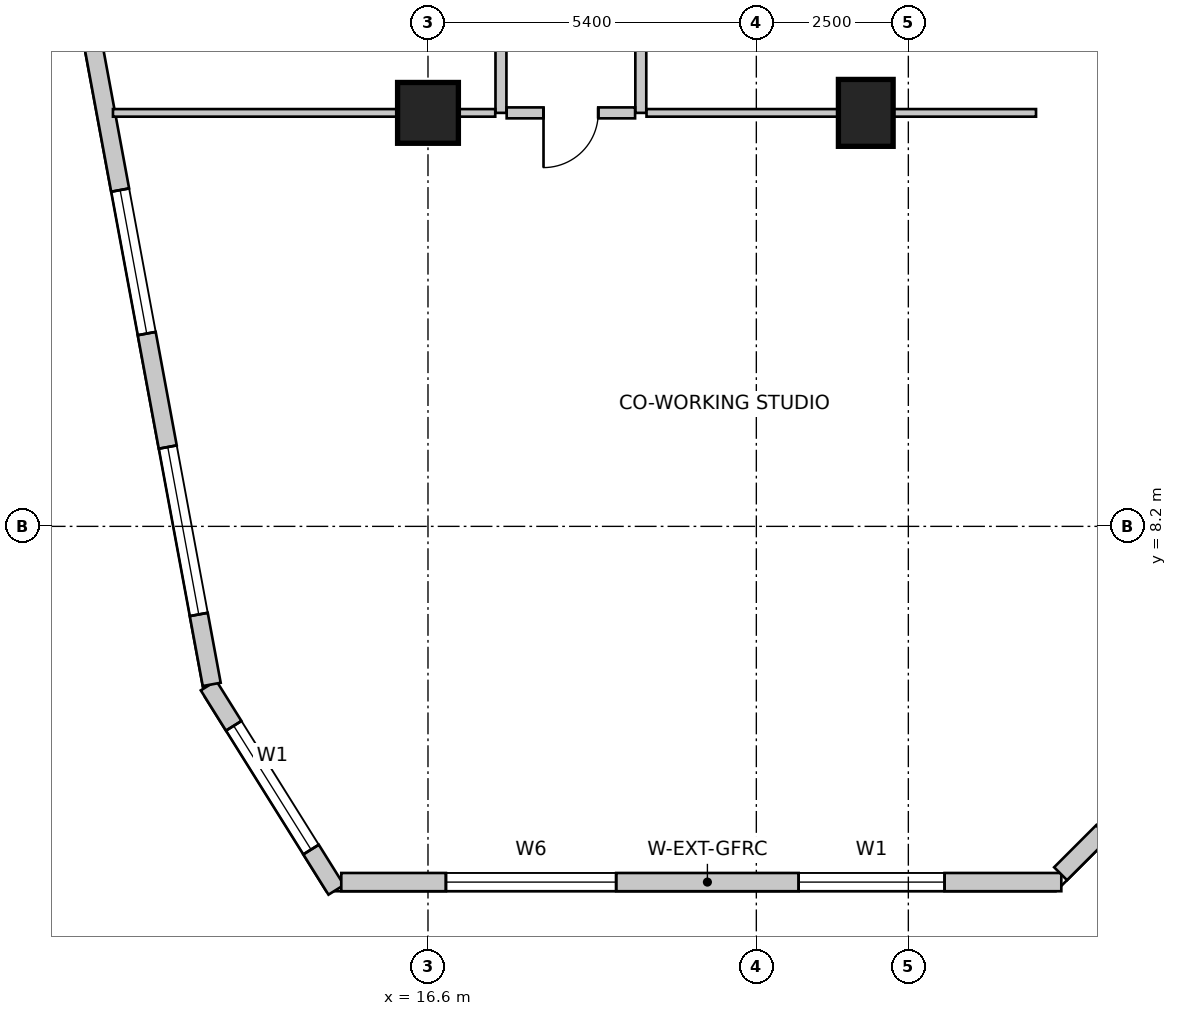
"""IFC4 building model, lengths in metres.
Left out: names, types, materials, properties, quantities, classifications, styles, units other than length and angle.
Written with IfcOpenShell. Run it as: python <this file> out.ifc"""

import sys

from ifc_helpers import new_model, si_unit, direction, frame, frame_2d, origin, origin_2d, place, context, subcontext, project, spatial, rectangle, extrude, source, transform, mapped, element, fill, save


model = new_model("IFC4")
c1 = context("Model", 3, precision=1e-05, world=origin(), true_north=direction((0.0, 1.0)))
c2 = subcontext(c1, "Body", "Model", "MODEL_VIEW")
j1 = project(units=[si_unit("LENGTHUNIT", "METRE"), si_unit("PLANEANGLEUNIT", "RADIAN")], contexts=[c1])
p1 = place(None, origin())
s1 = spatial("IfcSite", under=j1, at=p1, CompositionType="ELEMENT")
p2 = place(p1, origin())
s2 = spatial("IfcBuilding", under=s1, at=p2, CompositionType="ELEMENT")
p3 = place(p2, frame((0.0, 0.0, 51.0)))
s3 = spatial("IfcBuildingStorey", under=s2, at=p3, CompositionType="ELEMENT", Elevation=51.0)
m1 = source(origin(), c2, "Body", "SweptSolid", [
    extrude(rectangle(XDim=0.9, YDim=1.1, at=origin_2d()), origin(), (0.0, 0.0, 1.0), 4.0),
])
p4 = place(p3, frame((23.8, 15.0, 0.0), z_axis=(0.0, 0.0, 1.0), x_axis=(1.0, 0.0, 0.0)))
e1 = element("IfcColumn", 1, at=p4, inside=s3, PredefinedType="COLUMN", context=c2, shape_type="MappedRepresentation", body=[
    mapped(m1, transform((0.0, 0.0, 0.0), scale=1.0)),
])
m2 = source(origin(), c2, "Body", "SweptSolid", [
    extrude(rectangle(XDim=1.0, YDim=1.0, at=origin_2d()), origin(), (0.0, 0.0, 1.0), 4.0),
])
p5 = place(p3, frame((16.6, 15.0, 0.0), z_axis=(0.0, 0.0, 1.0), x_axis=(1.0, 0.0, 0.0)))
e2 = element("IfcColumn", 2, at=p5, inside=s3, PredefinedType="COLUMN", context=c2, shape_type="MappedRepresentation", body=[
    mapped(m2, transform((0.0, 0.0, 0.0), scale=1.0)),
])
p6 = place(p3, frame((12.991, 5.583, 0.0), z_axis=(0.0, 0.0, 1.0), x_axis=(0.530015557218, -0.847987918019, 0.0)))
e3 = element("IfcWall", 3, at=p6, inside=s3, PredefinedType="SOLIDWALL", context=c2, shape_type="SweptSolid", body=[
    extrude(rectangle(XDim=3.962, YDim=0.3, at=frame_2d((1.981, 0.0))), origin(), (0.0, 0.0, 1.0), 3.75),
])
m3 = source(origin(), c2, "Body", "SweptSolid", [
    extrude(rectangle(XDim=2.4, YDim=2.2, at=frame_2d((1.2, 1.1))), frame((0.0, 0.16, 0.0), z_axis=(0.0, -1.0, 0.0), x_axis=(1.0, 0.0, 0.0)), (0.0, 0.0, 1.0), 0.32),
])
p7 = place(p6, frame((0.781, 0.0, 0.85)))
e4 = element("IfcOpeningElement", 4, at=p7, cuts=e3, PredefinedType="OPENING", context=c2, shape_type="MappedRepresentation", body=[
    mapped(m3, transform((0.0, 0.0, 0.0), scale=1.0)),
])
p8 = place(p3, frame((15.174, 2.35, 0.0), z_axis=(0.0, 0.0, 1.0), x_axis=(1.0, 0.0, 0.0)))
e5 = element("IfcWall", 5, at=p8, inside=s3, PredefinedType="SOLIDWALL", context=c2, shape_type="SweptSolid", body=[
    extrude(rectangle(XDim=11.842, YDim=0.3, at=frame_2d((5.921, 0.0))), origin(), (0.0, 0.0, 1.0), 3.75),
])
m4 = source(origin(), c2, "Body", "SweptSolid", [
    extrude(rectangle(XDim=2.8, YDim=2.4, at=frame_2d((1.4, 1.2))), frame((0.0, 0.16, 0.0), z_axis=(0.0, -1.0, 0.0), x_axis=(1.0, 0.0, 0.0)), (0.0, 0.0, 1.0), 0.32),
])
p9 = place(p8, frame((1.721, 0.0, 0.85)))
e6 = element("IfcOpeningElement", 6, at=p9, cuts=e5, PredefinedType="OPENING", context=c2, shape_type="MappedRepresentation", body=[
    mapped(m4, transform((0.0, 0.0, 0.0), scale=1.0)),
])
p10 = place(p8, frame((7.522, 0.0, 0.85)))
e7 = element("IfcOpeningElement", 7, at=p10, cuts=e5, PredefinedType="OPENING", context=c2, shape_type="MappedRepresentation", body=[
    mapped(m3, transform((0.0, 0.0, 0.0), scale=1.0)),
])
p11 = place(p3, frame((27.004, 2.488, 0.0), z_axis=(0.0, 0.0, 1.0), x_axis=(0.707106781187, 0.707106781187, 0.0)))
e8 = element("IfcWall", 8, at=p11, inside=s3, PredefinedType="SOLIDWALL", context=c2, shape_type="SweptSolid", body=[
    extrude(rectangle(XDim=4.356, YDim=0.3, at=frame_2d((2.178, 0.0))), origin(), (0.0, 0.0, 1.0), 3.75),
])
p12 = place(p11, frame((0.978, 0.0, 0.85)))
e9 = element("IfcOpeningElement", 9, at=p12, cuts=e8, PredefinedType="OPENING", context=c2, shape_type="MappedRepresentation", body=[
    mapped(m3, transform((0.0, 0.0, 0.0), scale=1.0)),
])
p13 = place(p3, frame((8.183, 31.833, 0.0), z_axis=(0.0, 0.0, 1.0), x_axis=(0.18216364648, -0.983268226834, 0.0)))
e10 = element("IfcWall", 10, at=p13, inside=s3, PredefinedType="SOLIDWALL", context=c2, shape_type="SweptSolid", body=[
    extrude(rectangle(XDim=26.678, YDim=0.3, at=frame_2d((13.339, 0.0))), origin(), (0.0, 0.0, 1.0), 3.75),
])
m5 = source(origin(), c2, "Body", "SweptSolid", [
    extrude(rectangle(XDim=1.8, YDim=2.1, at=frame_2d((0.9, 1.05))), frame((0.0, 0.16, 0.0), z_axis=(0.0, -1.0, 0.0), x_axis=(1.0, 0.0, 0.0)), (0.0, 0.0, 1.0), 0.32),
])
p14 = place(p13, frame((1.164, 0.0, 0.85)))
e11 = element("IfcOpeningElement", 11, at=p14, cuts=e10, PredefinedType="OPENING", context=c2, shape_type="MappedRepresentation", body=[
    mapped(m5, transform((0.0, 0.0, 0.0), scale=1.0)),
])
p15 = place(p13, frame((4.5, 0.0, 0.85)))
e12 = element("IfcOpeningElement", 12, at=p15, cuts=e10, PredefinedType="OPENING", context=c2, shape_type="MappedRepresentation", body=[
    mapped(m3, transform((0.0, 0.0, 0.0), scale=1.0)),
])
p16 = place(p13, frame((9.076, 0.0, 0.85)))
e13 = element("IfcOpeningElement", 13, at=p16, cuts=e10, PredefinedType="OPENING", context=c2, shape_type="MappedRepresentation", body=[
    mapped(m3, transform((0.0, 0.0, 0.0), scale=1.0)),
])
p17 = place(p13, frame((13.653, 0.0, 0.85)))
e14 = element("IfcOpeningElement", 14, at=p17, cuts=e10, PredefinedType="OPENING", context=c2, shape_type="MappedRepresentation", body=[
    mapped(m3, transform((0.0, 0.0, 0.0), scale=1.0)),
])
p18 = place(p13, frame((18.411, 0.0, 0.85)))
e15 = element("IfcOpeningElement", 15, at=p18, cuts=e10, PredefinedType="OPENING", context=c2, shape_type="MappedRepresentation", body=[
    mapped(m3, transform((0.0, 0.0, 0.0), scale=1.0)),
])
p19 = place(p13, frame((22.709, 0.0, 0.85)))
e16 = element("IfcOpeningElement", 16, at=p19, cuts=e10, PredefinedType="OPENING", context=c2, shape_type="MappedRepresentation", body=[
    mapped(m4, transform((0.0, 0.0, 0.0), scale=1.0)),
])
p20 = place(p3, frame((17.8, 15.0, 0.0), z_axis=(0.0, 0.0, 1.0), x_axis=(0.0, 1.0, 0.0)))
e17 = element("IfcWall", 17, at=p20, inside=s3, PredefinedType="PARTITIONING", context=c2, shape_type="SweptSolid", body=[
    extrude(rectangle(XDim=4.66, YDim=0.18, at=frame_2d((2.33, 0.0))), origin(), (0.0, 0.0, 1.0), 2.892),
])
m6 = source(origin(), c2, "Body", "SweptSolid", [
    extrude(rectangle(XDim=0.9, YDim=2.15, at=frame_2d((0.45, 1.075))), frame((0.0, 0.1, 0.0), z_axis=(0.0, -1.0, 0.0), x_axis=(1.0, 0.0, 0.0)), (0.0, 0.0, 1.0), 0.2),
])
p21 = place(p20, frame((1.88, 0.0, 0.0)))
e18 = element("IfcOpeningElement", 18, at=p21, cuts=e17, PredefinedType="OPENING", context=c2, shape_type="MappedRepresentation", body=[
    mapped(m6, transform((0.0, 0.0, 0.0), scale=1.0)),
])
p22 = place(p3, frame((20.1, 19.66, 0.0), z_axis=(0.0, 0.0, 1.0), x_axis=(0.0, -1.0, 0.0)))
e19 = element("IfcWall", 19, at=p22, inside=s3, PredefinedType="PARTITIONING", context=c2, shape_type="SweptSolid", body=[
    extrude(rectangle(XDim=4.66, YDim=0.18, at=frame_2d((2.33, 0.0))), origin(), (0.0, 0.0, 1.0), 2.892),
])
p23 = place(p22, frame((1.88, 0.0, 0.0)))
e20 = element("IfcOpeningElement", 20, at=p23, cuts=e19, PredefinedType="OPENING", context=c2, shape_type="MappedRepresentation", body=[
    mapped(m6, transform((0.0, 0.0, 0.0), scale=1.0)),
])
p24 = place(p3, frame((20.006, 15.0, 0.0), z_axis=(0.0, 0.0, 1.0), x_axis=(-1.0, 0.0, 0.0)))
e21 = element("IfcWall", 21, at=p24, inside=s3, PredefinedType="PARTITIONING", context=c2, shape_type="SweptSolid", body=[
    extrude(rectangle(XDim=2.112, YDim=0.18, at=frame_2d((1.056, 0.0))), origin(), (0.0, 0.0, 1.0), 2.892),
])
p25 = place(p24, frame((0.606, 0.0, 0.0)))
e22 = element("IfcOpeningElement", 22, at=p25, cuts=e21, PredefinedType="OPENING", context=c2, shape_type="MappedRepresentation", body=[
    mapped(m6, transform((0.0, 0.0, 0.0), scale=1.0)),
])
p26 = place(p3, frame((17.706, 15.0, 0.0), z_axis=(0.0, 0.0, 1.0), x_axis=(-1.0, 0.0, 0.0)))
e23 = element("IfcWall", 23, at=p26, inside=s3, PredefinedType="PARTITIONING", context=c2, shape_type="SweptSolid", body=[
    extrude(rectangle(XDim=6.287, YDim=0.125, at=frame_2d((3.144, 0.0))), origin(), (0.0, 0.0, 1.0), 2.892),
])
p27 = place(p3, frame((26.6, 15.0, 0.0), z_axis=(0.0, 0.0, 1.0), x_axis=(-1.0, 0.0, 0.0)))
e24 = element("IfcWall", 24, at=p27, inside=s3, PredefinedType="PARTITIONING", context=c2, shape_type="SweptSolid", body=[
    extrude(rectangle(XDim=6.406, YDim=0.125, at=frame_2d((3.203, 0.0))), origin(), (0.0, 0.0, 1.0), 2.892),
])
m7 = source(origin(), c2, "Body", "SweptSolid", [
    extrude(rectangle(XDim=2.4, YDim=2.2, at=frame_2d((1.2, 1.1))), frame((0.0, -0.015, 0.0), z_axis=(0.0, -1.0, 0.0), x_axis=(1.0, 0.0, 0.0)), (0.0, 0.0, 1.0), 0.06),
])
p28 = place(p7, origin())
e25 = element("IfcWindow", 25, at=p28, inside=s3, PartitioningType="SINGLE_PANEL", PredefinedType="WINDOW", context=c2, shape_type="MappedRepresentation", body=[
    mapped(m7, transform((0.0, 0.0, 0.0), scale=1.0)),
])
fill(e4, e25)
m8 = source(origin(), c2, "Body", "SweptSolid", [
    extrude(rectangle(XDim=2.8, YDim=2.4, at=frame_2d((1.4, 1.2))), frame((0.0, -0.015, 0.0), z_axis=(0.0, -1.0, 0.0), x_axis=(1.0, 0.0, 0.0)), (0.0, 0.0, 1.0), 0.06),
])
p29 = place(p9, origin())
e26 = element("IfcWindow", 26, at=p29, inside=s3, PartitioningType="SINGLE_PANEL", PredefinedType="WINDOW", context=c2, shape_type="MappedRepresentation", body=[
    mapped(m8, transform((0.0, 0.0, 0.0), scale=1.0)),
])
fill(e6, e26)
p30 = place(p10, origin())
e27 = element("IfcWindow", 27, at=p30, inside=s3, PartitioningType="SINGLE_PANEL", PredefinedType="WINDOW", context=c2, shape_type="MappedRepresentation", body=[
    mapped(m7, transform((0.0, 0.0, 0.0), scale=1.0)),
])
fill(e7, e27)
p31 = place(p18, origin())
e28 = element("IfcWindow", 28, at=p31, inside=s3, PartitioningType="SINGLE_PANEL", PredefinedType="WINDOW", context=c2, shape_type="MappedRepresentation", body=[
    mapped(m7, transform((0.0, 0.0, 0.0), scale=1.0)),
])
fill(e15, e28)
p32 = place(p19, origin())
e29 = element("IfcWindow", 29, at=p32, inside=s3, PartitioningType="SINGLE_PANEL", PredefinedType="WINDOW", context=c2, shape_type="MappedRepresentation", body=[
    mapped(m8, transform((0.0, 0.0, 0.0), scale=1.0)),
])
fill(e16, e29)
m9 = source(origin(), c2, "Body", "SweptSolid", [
    extrude(rectangle(XDim=0.9, YDim=2.15, at=frame_2d((0.45, 1.075))), frame((0.0, 0.025, 0.0), z_axis=(0.0, -1.0, 0.0), x_axis=(1.0, 0.0, 0.0)), (0.0, 0.0, 1.0), 0.05),
])
p33 = place(p25, origin())
e30 = element("IfcDoor", 30, at=p33, inside=s3, OperationType="SINGLE_SWING_RIGHT", PredefinedType="DOOR", context=c2, shape_type="MappedRepresentation", body=[
    mapped(m9, transform((0.0, 0.0, 0.0), scale=1.0)),
])
fill(e22, e30)
save(model, sys.argv[1])
